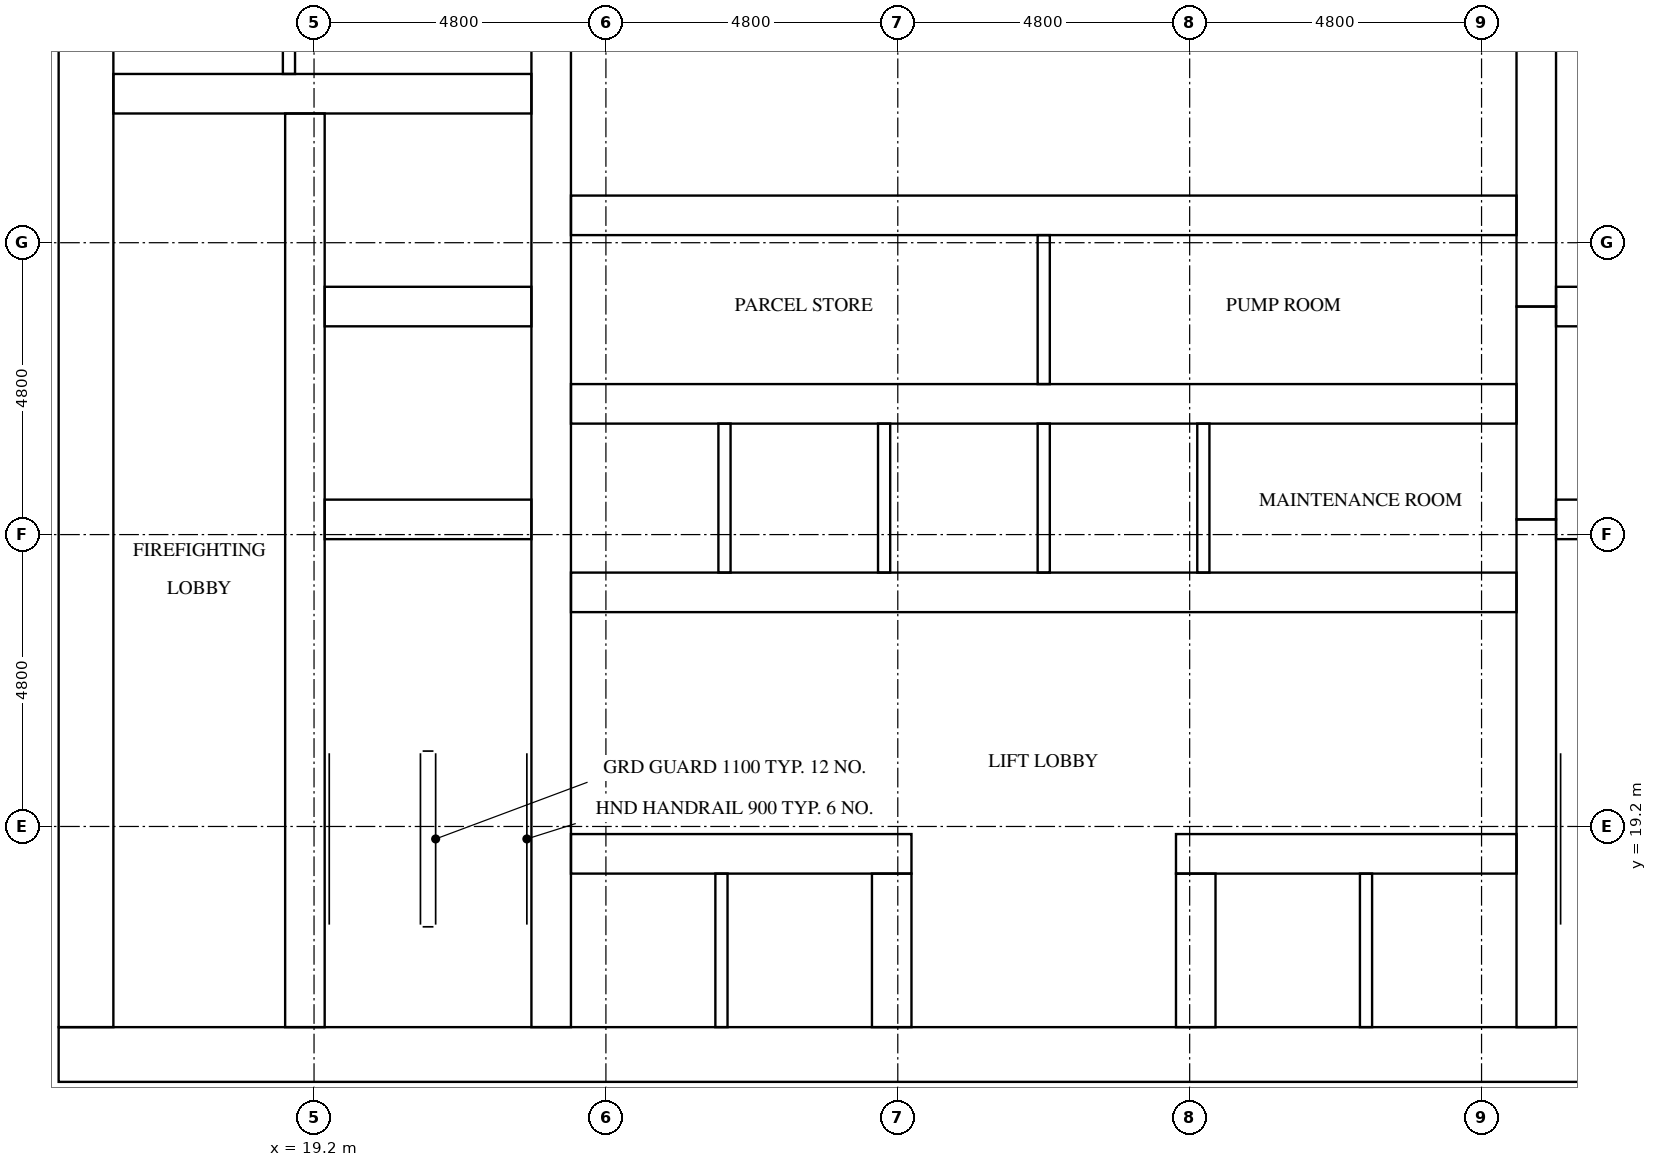
"""IFC4 building model, lengths in metres.
Left out: names, types, materials, properties, quantities, classifications, styles, units other than length and angle.
Written with IfcOpenShell. Run it as: python <this file> out.ifc"""

import sys

from ifc_helpers import new_model, si_unit, direction, frame, frame_2d, origin, place, context, subcontext, project, spatial, rectangle, extrude, element, fill, save


model = new_model("IFC4")
c1 = context("Model", 3, precision=1e-05, world=origin(), true_north=direction((0.0, 1.0)))
c2 = subcontext(c1, "Body", "Model", "MODEL_VIEW")
j1 = project(units=[si_unit("LENGTHUNIT", "METRE"), si_unit("PLANEANGLEUNIT", "RADIAN")], contexts=[c1])
p1 = place(None, origin())
s1 = spatial("IfcSite", under=j1, at=p1, CompositionType="ELEMENT")
p2 = place(p1, origin())
s2 = spatial("IfcBuilding", under=s1, at=p2, CompositionType="ELEMENT")
p3 = place(p2, frame((0.0, 0.0, 73.3)))
s3 = spatial("IfcBuildingStorey", under=s2, at=p3, CompositionType="ELEMENT", Elevation=73.3)
p4 = place(p3, frame((15.0, 15.45, 0.0), z_axis=(0.0, 0.0, 1.0), x_axis=(1.0, 0.0, 0.0)))
e1 = element("IfcWall", 1, at=p4, inside=s3, PredefinedType="SHEAR", context=c2, shape_type="SweptSolid", body=[
    extrude(rectangle(XDim=32.4, YDim=0.9, at=frame_2d((16.2, 0.0))), origin(), (0.0, 0.0, 1.0), 3.2),
])
p5 = place(p4, frame((15.3, 0.0, 0.0)))
e2 = element("IfcOpeningElement", 2, at=p5, cuts=e1, PredefinedType="OPENING", context=c2, shape_type="SweptSolid", body=[
    extrude(rectangle(XDim=1.8, YDim=2.1, at=frame_2d((0.9, 1.05))), frame((0.0, 0.46, 0.0), z_axis=(0.0, -1.0, 0.0), x_axis=(1.0, 0.0, 0.0)), (0.0, 0.0, 1.0), 0.92),
])
p6 = place(p3, frame((15.45, 15.9, 0.0), z_axis=(0.0, 0.0, 1.0), x_axis=(0.0, 1.0, 0.0)))
e3 = element("IfcWall", 3, at=p6, inside=s3, PredefinedType="SHEAR", context=c2, shape_type="SweptSolid", body=[
    extrude(rectangle(XDim=21.0, YDim=0.9, at=frame_2d((10.5, 0.0))), origin(), (0.0, 0.0, 1.0), 3.2),
])
p7 = place(p6, frame((4.86, 0.0, 0.0)))
e4 = element("IfcOpeningElement", 4, at=p7, cuts=e3, PredefinedType="OPENING", context=c2, shape_type="SweptSolid", body=[
    extrude(rectangle(XDim=1.2, YDim=2.1, at=frame_2d((0.6, 1.05))), frame((0.0, 0.46, 0.0), z_axis=(0.0, -1.0, 0.0), x_axis=(1.0, 0.0, 0.0)), (0.0, 0.0, 1.0), 0.92),
])
p8 = place(p3, frame((19.05, 15.9, 0.0), z_axis=(0.0, 0.0, 1.0), x_axis=(0.0, 1.0, 0.0)))
e5 = element("IfcWall", 5, at=p8, inside=s3, PredefinedType="SHEAR", context=c2, shape_type="SweptSolid", body=[
    extrude(rectangle(XDim=15.025, YDim=0.65, at=frame_2d((7.513, 0.0))), origin(), (0.0, 0.0, 1.0), 3.2),
])
p9 = place(p8, frame((9.55, 0.0, 0.0)))
e6 = element("IfcOpeningElement", 6, at=p9, cuts=e5, PredefinedType="OPENING", context=c2, shape_type="SweptSolid", body=[
    extrude(rectangle(XDim=1.1, YDim=2.1, at=frame_2d((0.55, 1.05))), frame((0.0, 0.335, 0.0), z_axis=(0.0, -1.0, 0.0), x_axis=(1.0, 0.0, 0.0)), (0.0, 0.0, 1.0), 0.67),
])
p10 = place(p8, frame((13.05, 0.0, 0.0)))
e7 = element("IfcOpeningElement", 7, at=p10, cuts=e5, PredefinedType="OPENING", context=c2, shape_type="SweptSolid", body=[
    extrude(rectangle(XDim=1.1, YDim=2.1, at=frame_2d((0.55, 1.05))), frame((0.0, 0.335, 0.0), z_axis=(0.0, -1.0, 0.0), x_axis=(1.0, 0.0, 0.0)), (0.0, 0.0, 1.0), 0.67),
])
p11 = place(p8, frame((0.3, 0.0, 0.0)))
e8 = element("IfcOpeningElement", 8, at=p11, cuts=e5, PredefinedType="OPENING", context=c2, shape_type="SweptSolid", body=[
    extrude(rectangle(XDim=1.2, YDim=2.1, at=frame_2d((0.6, 1.05))), frame((0.0, 0.335, 0.0), z_axis=(0.0, -1.0, 0.0), x_axis=(1.0, 0.0, 0.0)), (0.0, 0.0, 1.0), 0.67),
])
p12 = place(p3, frame((23.1, 15.9, 0.0), z_axis=(0.0, 0.0, 1.0), x_axis=(0.0, 1.0, 0.0)))
e9 = element("IfcWall", 9, at=p12, inside=s3, PredefinedType="SHEAR", context=c2, shape_type="SweptSolid", body=[
    extrude(rectangle(XDim=21.0, YDim=0.65, at=frame_2d((10.5, 0.0))), origin(), (0.0, 0.0, 1.0), 3.2),
])
p13 = place(p3, frame((39.3, 15.9, 0.0), z_axis=(0.0, 0.0, 1.0), x_axis=(0.0, 1.0, 0.0)))
e10 = element("IfcWall", 10, at=p13, inside=s3, PredefinedType="SHEAR", context=c2, shape_type="SweptSolid", body=[
    extrude(rectangle(XDim=8.35, YDim=0.65, at=frame_2d((4.175, 0.0))), origin(), (0.0, 0.0, 1.0), 3.2),
])
p14 = place(p3, frame((39.3, 24.25, 0.0), z_axis=(0.0, 0.0, 1.0), x_axis=(0.0, 1.0, 0.0)))
e11 = element("IfcWall", 11, at=p14, inside=s3, PredefinedType="SHEAR", context=c2, shape_type="SweptSolid", body=[
    extrude(rectangle(XDim=3.5, YDim=0.65, at=frame_2d((1.75, 0.0))), origin(), (0.0, 0.0, 1.0), 3.2),
])
p15 = place(p3, frame((39.3, 27.75, 0.0), z_axis=(0.0, 0.0, 1.0), x_axis=(0.0, 1.0, 0.0)))
e12 = element("IfcWall", 12, at=p15, inside=s3, PredefinedType="SHEAR", context=c2, shape_type="SweptSolid", body=[
    extrude(rectangle(XDim=9.15, YDim=0.65, at=frame_2d((4.575, 0.0))), origin(), (0.0, 0.0, 1.0), 3.2),
])
for number, where, z_axis, x_axis in (
    (13, (19.375, 24.25, 0.0), (0.0, 0.0, 1.0), (1.0, 0.0, 0.0)),
    (14, (19.375, 27.75, 0.0), (0.0, 0.0, 1.0), (1.0, 0.0, 0.0)),
):
    element("IfcWall", number, at=place(p3, frame(where, z_axis=z_axis, x_axis=x_axis)), inside=s3, PredefinedType="SHEAR", context=c2, shape_type="SweptSolid", body=[
        extrude(rectangle(XDim=3.4, YDim=0.65, at=frame_2d((1.7, 0.0))), origin(), (0.0, 0.0, 1.0), 3.2),
    ])
p16 = place(p3, frame((15.9, 31.25, 0.0), z_axis=(0.0, 0.0, 1.0), x_axis=(1.0, 0.0, 0.0)))
e15 = element("IfcWall", 15, at=p16, inside=s3, PredefinedType="SHEAR", context=c2, shape_type="SweptSolid", body=[
    extrude(rectangle(XDim=6.875, YDim=0.65, at=frame_2d((3.438, 0.0))), origin(), (0.0, 0.0, 1.0), 3.2),
])
for number, where, z_axis, x_axis in (
    (16, (39.625, 24.25, 0.0), (0.0, 0.0, 1.0), (1.0, 0.0, 0.0)),
    (17, (39.625, 27.75, 0.0), (0.0, 0.0, 1.0), (1.0, 0.0, 0.0)),
):
    element("IfcWall", number, at=place(p3, frame(where, z_axis=z_axis, x_axis=x_axis)), inside=s3, PredefinedType="SHEAR", context=c2, shape_type="SweptSolid", body=[
        extrude(rectangle(XDim=3.4, YDim=0.65, at=frame_2d((1.7, 0.0))), origin(), (0.0, 0.0, 1.0), 3.2),
    ])
p17 = place(p3, frame((23.425, 18.75, 0.0), z_axis=(0.0, 0.0, 1.0), x_axis=(1.0, 0.0, 0.0)))
e18 = element("IfcWall", 18, at=p17, inside=s3, PredefinedType="SHEAR", context=c2, shape_type="SweptSolid", body=[
    extrude(rectangle(XDim=5.6, YDim=0.65, at=frame_2d((2.8, 0.0))), origin(), (0.0, 0.0, 1.0), 3.2),
])
p18 = place(p17, frame((0.637, 0.0, 0.0)))
e19 = element("IfcOpeningElement", 19, at=p18, cuts=e18, PredefinedType="OPENING", context=c2, shape_type="SweptSolid", body=[
    extrude(rectangle(XDim=1.1, YDim=2.1, at=frame_2d((0.55, 1.05))), frame((0.0, 0.335, 0.0), z_axis=(0.0, -1.0, 0.0), x_axis=(1.0, 0.0, 0.0)), (0.0, 0.0, 1.0), 0.67),
])
p19 = place(p17, frame((3.212, 0.0, 0.0)))
e20 = element("IfcOpeningElement", 20, at=p19, cuts=e18, PredefinedType="OPENING", context=c2, shape_type="SweptSolid", body=[
    extrude(rectangle(XDim=1.1, YDim=2.1, at=frame_2d((0.55, 1.05))), frame((0.0, 0.335, 0.0), z_axis=(0.0, -1.0, 0.0), x_axis=(1.0, 0.0, 0.0)), (0.0, 0.0, 1.0), 0.67),
])
p20 = place(p3, frame((33.375, 18.75, 0.0), z_axis=(0.0, 0.0, 1.0), x_axis=(1.0, 0.0, 0.0)))
e21 = element("IfcWall", 21, at=p20, inside=s3, PredefinedType="SHEAR", context=c2, shape_type="SweptSolid", body=[
    extrude(rectangle(XDim=5.6, YDim=0.65, at=frame_2d((2.8, 0.0))), origin(), (0.0, 0.0, 1.0), 3.2),
])
p21 = place(p20, frame((1.288, 0.0, 0.0)))
e22 = element("IfcOpeningElement", 22, at=p21, cuts=e21, PredefinedType="OPENING", context=c2, shape_type="SweptSolid", body=[
    extrude(rectangle(XDim=1.1, YDim=2.1, at=frame_2d((0.55, 1.05))), frame((0.0, 0.335, 0.0), z_axis=(0.0, -1.0, 0.0), x_axis=(1.0, 0.0, 0.0)), (0.0, 0.0, 1.0), 0.67),
])
p22 = place(p20, frame((3.863, 0.0, 0.0)))
e23 = element("IfcOpeningElement", 23, at=p22, cuts=e21, PredefinedType="OPENING", context=c2, shape_type="SweptSolid", body=[
    extrude(rectangle(XDim=1.1, YDim=2.1, at=frame_2d((0.55, 1.05))), frame((0.0, 0.335, 0.0), z_axis=(0.0, -1.0, 0.0), x_axis=(1.0, 0.0, 0.0)), (0.0, 0.0, 1.0), 0.67),
])
p23 = place(p3, frame((23.425, 23.05, 0.0), z_axis=(0.0, 0.0, 1.0), x_axis=(1.0, 0.0, 0.0)))
e24 = element("IfcWall", 24, at=p23, inside=s3, PredefinedType="SHEAR", context=c2, shape_type="SweptSolid", body=[
    extrude(rectangle(XDim=15.55, YDim=0.65, at=frame_2d((7.775, 0.0))), origin(), (0.0, 0.0, 1.0), 3.2),
])
p24 = place(p23, frame((0.663, 0.0, 0.0)))
e25 = element("IfcOpeningElement", 25, at=p24, cuts=e24, PredefinedType="OPENING", context=c2, shape_type="SweptSolid", body=[
    extrude(rectangle(XDim=1.1, YDim=2.1, at=frame_2d((0.55, 1.05))), frame((0.0, 0.335, 0.0), z_axis=(0.0, -1.0, 0.0), x_axis=(1.0, 0.0, 0.0)), (0.0, 0.0, 1.0), 0.67),
])
p25 = place(p23, frame((3.288, 0.0, 0.0)))
e26 = element("IfcOpeningElement", 26, at=p25, cuts=e24, PredefinedType="OPENING", context=c2, shape_type="SweptSolid", body=[
    extrude(rectangle(XDim=1.1, YDim=2.1, at=frame_2d((0.55, 1.05))), frame((0.0, 0.335, 0.0), z_axis=(0.0, -1.0, 0.0), x_axis=(1.0, 0.0, 0.0)), (0.0, 0.0, 1.0), 0.67),
])
p26 = place(p23, frame((12.525, 0.0, 0.0)))
e27 = element("IfcOpeningElement", 27, at=p26, cuts=e24, PredefinedType="OPENING", context=c2, shape_type="SweptSolid", body=[
    extrude(rectangle(XDim=1.0, YDim=2.1, at=frame_2d((0.5, 1.05))), frame((0.0, 0.335, 0.0), z_axis=(0.0, -1.0, 0.0), x_axis=(1.0, 0.0, 0.0)), (0.0, 0.0, 1.0), 0.67),
])
p27 = place(p3, frame((23.425, 26.15, 0.0), z_axis=(0.0, 0.0, 1.0), x_axis=(1.0, 0.0, 0.0)))
e28 = element("IfcWall", 28, at=p27, inside=s3, PredefinedType="SHEAR", context=c2, shape_type="SweptSolid", body=[
    extrude(rectangle(XDim=15.55, YDim=0.65, at=frame_2d((7.775, 0.0))), origin(), (0.0, 0.0, 1.0), 3.2),
])
p28 = place(p3, frame((23.425, 29.25, 0.0), z_axis=(0.0, 0.0, 1.0), x_axis=(1.0, 0.0, 0.0)))
e29 = element("IfcWall", 29, at=p28, inside=s3, PredefinedType="SHEAR", context=c2, shape_type="SweptSolid", body=[
    extrude(rectangle(XDim=15.55, YDim=0.65, at=frame_2d((7.775, 0.0))), origin(), (0.0, 0.0, 1.0), 3.2),
])
p29 = place(p28, frame((3.337, 0.0, 0.0)))
e30 = element("IfcOpeningElement", 30, at=p29, cuts=e29, PredefinedType="OPENING", context=c2, shape_type="SweptSolid", body=[
    extrude(rectangle(XDim=1.0, YDim=2.1, at=frame_2d((0.5, 1.05))), frame((0.0, 0.335, 0.0), z_axis=(0.0, -1.0, 0.0), x_axis=(1.0, 0.0, 0.0)), (0.0, 0.0, 1.0), 0.67),
])
p30 = place(p28, frame((11.212, 0.0, 0.0)))
e31 = element("IfcOpeningElement", 31, at=p30, cuts=e29, PredefinedType="OPENING", context=c2, shape_type="SweptSolid", body=[
    extrude(rectangle(XDim=1.0, YDim=2.1, at=frame_2d((0.5, 1.05))), frame((0.0, 0.335, 0.0), z_axis=(0.0, -1.0, 0.0), x_axis=(1.0, 0.0, 0.0)), (0.0, 0.0, 1.0), 0.67),
])
for number, where, z_axis, x_axis in (
    (32, (28.7, 15.9, 0.0), (0.0, 0.0, 1.0), (0.0, 1.0, 0.0)),
    (33, (33.7, 15.9, 0.0), (0.0, 0.0, 1.0), (0.0, 1.0, 0.0)),
):
    element("IfcWall", number, at=place(p3, frame(where, z_axis=z_axis, x_axis=x_axis)), inside=s3, PredefinedType="SHEAR", context=c2, shape_type="SweptSolid", body=[
        extrude(rectangle(XDim=2.525, YDim=0.65, at=frame_2d((1.263, 0.0))), origin(), (0.0, 0.0, 1.0), 3.2),
    ])
for number, where, z_axis, x_axis in (
    (34, (25.95, 23.375, 0.0), (0.0, 0.0, 1.0), (0.0, 1.0, 0.0)),
    (35, (28.575, 23.375, 0.0), (0.0, 0.0, 1.0), (0.0, 1.0, 0.0)),
    (36, (31.2, 23.375, 0.0), (0.0, 0.0, 1.0), (0.0, 1.0, 0.0)),
    (37, (33.825, 23.375, 0.0), (0.0, 0.0, 1.0), (0.0, 1.0, 0.0)),
):
    element("IfcWall", number, at=place(p3, frame(where, z_axis=z_axis, x_axis=x_axis)), inside=s3, PredefinedType="SOLIDWALL", context=c2, shape_type="SweptSolid", body=[
        extrude(rectangle(XDim=2.45, YDim=0.2, at=frame_2d((1.225, 0.0))), origin(), (0.0, 0.0, 1.0), 3.2),
    ])
for number, where, z_axis, x_axis in (
    (38, (25.9, 15.9, 0.0), (0.0, 0.0, 1.0), (0.0, 1.0, 0.0)),
    (39, (36.5, 15.9, 0.0), (0.0, 0.0, 1.0), (0.0, 1.0, 0.0)),
):
    element("IfcWall", number, at=place(p3, frame(where, z_axis=z_axis, x_axis=x_axis)), inside=s3, PredefinedType="SOLIDWALL", context=c2, shape_type="SweptSolid", body=[
        extrude(rectangle(XDim=2.525, YDim=0.2, at=frame_2d((1.263, 0.0))), origin(), (0.0, 0.0, 1.0), 3.2),
    ])
p31 = place(p3, frame((18.788, 31.575, 0.0), z_axis=(0.0, 0.0, 1.0), x_axis=(0.0, 1.0, 0.0)))
e40 = element("IfcWall", 40, at=p31, inside=s3, PredefinedType="PARTITIONING", context=c2, shape_type="SweptSolid", body=[
    extrude(rectangle(XDim=5.325, YDim=0.2, at=frame_2d((2.663, 0.0))), origin(), (0.0, 0.0, 1.0), 3.2),
])
p32 = place(p3, frame((31.2, 26.475, 0.0), z_axis=(0.0, 0.0, 1.0), x_axis=(0.0, 1.0, 0.0)))
e41 = element("IfcWall", 41, at=p32, inside=s3, PredefinedType="PARTITIONING", context=c2, shape_type="SweptSolid", body=[
    extrude(rectangle(XDim=2.45, YDim=0.2, at=frame_2d((1.225, 0.0))), origin(), (0.0, 0.0, 1.0), 3.2),
])
p33 = place(p18, origin())
e42 = element("IfcDoor", 42, at=p33, inside=s3, OperationType="DOUBLE_DOOR_SLIDING", PredefinedType="DOOR", context=c2, shape_type="SweptSolid", body=[
    extrude(rectangle(XDim=1.1, YDim=2.1, at=frame_2d((0.55, 1.05))), frame((0.0, 0.025, 0.0), z_axis=(0.0, -1.0, 0.0), x_axis=(1.0, 0.0, 0.0)), (0.0, 0.0, 1.0), 0.05),
])
fill(e19, e42)
p34 = place(p19, origin())
e43 = element("IfcDoor", 43, at=p34, inside=s3, OperationType="DOUBLE_DOOR_SLIDING", PredefinedType="DOOR", context=c2, shape_type="SweptSolid", body=[
    extrude(rectangle(XDim=1.1, YDim=2.1, at=frame_2d((0.55, 1.05))), frame((0.0, 0.025, 0.0), z_axis=(0.0, -1.0, 0.0), x_axis=(1.0, 0.0, 0.0)), (0.0, 0.0, 1.0), 0.05),
])
fill(e20, e43)
p35 = place(p21, origin())
e44 = element("IfcDoor", 44, at=p35, inside=s3, OperationType="DOUBLE_DOOR_SLIDING", PredefinedType="DOOR", context=c2, shape_type="SweptSolid", body=[
    extrude(rectangle(XDim=1.1, YDim=2.1, at=frame_2d((0.55, 1.05))), frame((0.0, 0.025, 0.0), z_axis=(0.0, -1.0, 0.0), x_axis=(1.0, 0.0, 0.0)), (0.0, 0.0, 1.0), 0.05),
])
fill(e22, e44)
p36 = place(p22, origin())
e45 = element("IfcDoor", 45, at=p36, inside=s3, OperationType="DOUBLE_DOOR_SLIDING", PredefinedType="DOOR", context=c2, shape_type="SweptSolid", body=[
    extrude(rectangle(XDim=1.1, YDim=2.1, at=frame_2d((0.55, 1.05))), frame((0.0, 0.025, 0.0), z_axis=(0.0, -1.0, 0.0), x_axis=(1.0, 0.0, 0.0)), (0.0, 0.0, 1.0), 0.05),
])
fill(e23, e45)
p37 = place(p24, origin())
e46 = element("IfcDoor", 46, at=p37, inside=s3, OperationType="DOUBLE_DOOR_SLIDING", PredefinedType="DOOR", context=c2, shape_type="SweptSolid", body=[
    extrude(rectangle(XDim=1.1, YDim=2.1, at=frame_2d((0.55, 1.05))), frame((0.0, 0.025, 0.0), z_axis=(0.0, -1.0, 0.0), x_axis=(1.0, 0.0, 0.0)), (0.0, 0.0, 1.0), 0.05),
])
fill(e25, e46)
p38 = place(p25, origin())
e47 = element("IfcDoor", 47, at=p38, inside=s3, OperationType="DOUBLE_DOOR_SLIDING", PredefinedType="DOOR", context=c2, shape_type="SweptSolid", body=[
    extrude(rectangle(XDim=1.1, YDim=2.1, at=frame_2d((0.55, 1.05))), frame((0.0, 0.025, 0.0), z_axis=(0.0, -1.0, 0.0), x_axis=(1.0, 0.0, 0.0)), (0.0, 0.0, 1.0), 0.05),
])
fill(e26, e47)
p39 = place(p9, origin())
e48 = element("IfcDoor", 48, at=p39, inside=s3, OperationType="DOUBLE_DOOR_SLIDING", PredefinedType="DOOR", context=c2, shape_type="SweptSolid", body=[
    extrude(rectangle(XDim=1.1, YDim=2.1, at=frame_2d((0.55, 1.05))), frame((0.0, 0.025, 0.0), z_axis=(0.0, -1.0, 0.0), x_axis=(1.0, 0.0, 0.0)), (0.0, 0.0, 1.0), 0.05),
])
fill(e6, e48)
p40 = place(p10, origin())
e49 = element("IfcDoor", 49, at=p40, inside=s3, OperationType="DOUBLE_DOOR_SLIDING", PredefinedType="DOOR", context=c2, shape_type="SweptSolid", body=[
    extrude(rectangle(XDim=1.1, YDim=2.1, at=frame_2d((0.55, 1.05))), frame((0.0, 0.025, 0.0), z_axis=(0.0, -1.0, 0.0), x_axis=(1.0, 0.0, 0.0)), (0.0, 0.0, 1.0), 0.05),
])
fill(e7, e49)
p41 = place(p11, frame((1.2, 0.0, 0.0), z_axis=(0.0, 0.0, 1.0), x_axis=(-1.0, 0.0, 0.0)))
e50 = element("IfcDoor", 50, at=p41, inside=s3, OperationType="SINGLE_SWING_RIGHT", PredefinedType="DOOR", context=c2, shape_type="SweptSolid", body=[
    extrude(rectangle(XDim=1.2, YDim=2.1, at=frame_2d((0.6, 1.05))), frame((0.0, 0.025, 0.0), z_axis=(0.0, -1.0, 0.0), x_axis=(1.0, 0.0, 0.0)), (0.0, 0.0, 1.0), 0.05),
])
fill(e8, e50)
p42 = place(p5, frame((1.8, 0.0, 0.0), z_axis=(0.0, 0.0, 1.0), x_axis=(-1.0, 0.0, 0.0)))
e51 = element("IfcDoor", 51, at=p42, inside=s3, OperationType="DOUBLE_DOOR_SINGLE_SWING", PredefinedType="DOOR", context=c2, shape_type="SweptSolid", body=[
    extrude(rectangle(XDim=1.8, YDim=2.1, at=frame_2d((0.9, 1.05))), frame((0.0, 0.025, 0.0), z_axis=(0.0, -1.0, 0.0), x_axis=(1.0, 0.0, 0.0)), (0.0, 0.0, 1.0), 0.05),
])
fill(e2, e51)
p43 = place(p7, frame((1.2, 0.0, 0.0), z_axis=(0.0, 0.0, 1.0), x_axis=(-1.0, 0.0, 0.0)))
e52 = element("IfcDoor", 52, at=p43, inside=s3, OperationType="SINGLE_SWING_LEFT", PredefinedType="DOOR", context=c2, shape_type="SweptSolid", body=[
    extrude(rectangle(XDim=1.2, YDim=2.1, at=frame_2d((0.6, 1.05))), frame((0.0, 0.025, 0.0), z_axis=(0.0, -1.0, 0.0), x_axis=(1.0, 0.0, 0.0)), (0.0, 0.0, 1.0), 0.05),
])
fill(e4, e52)
p44 = place(p26, frame((1.0, 0.0, 0.0), z_axis=(0.0, 0.0, 1.0), x_axis=(-1.0, 0.0, 0.0)))
e53 = element("IfcDoor", 53, at=p44, inside=s3, OperationType="SINGLE_SWING_LEFT", PredefinedType="DOOR", context=c2, shape_type="SweptSolid", body=[
    extrude(rectangle(XDim=1.0, YDim=2.1, at=frame_2d((0.5, 1.05))), frame((0.0, 0.025, 0.0), z_axis=(0.0, -1.0, 0.0), x_axis=(1.0, 0.0, 0.0)), (0.0, 0.0, 1.0), 0.05),
])
fill(e27, e53)
p45 = place(p29, origin())
e54 = element("IfcDoor", 54, at=p45, inside=s3, OperationType="SINGLE_SWING_RIGHT", PredefinedType="DOOR", context=c2, shape_type="SweptSolid", body=[
    extrude(rectangle(XDim=1.0, YDim=2.1, at=frame_2d((0.5, 1.05))), frame((0.0, 0.025, 0.0), z_axis=(0.0, -1.0, 0.0), x_axis=(1.0, 0.0, 0.0)), (0.0, 0.0, 1.0), 0.05),
])
fill(e30, e54)
p46 = place(p30, origin())
e55 = element("IfcDoor", 55, at=p46, inside=s3, OperationType="SINGLE_SWING_LEFT", PredefinedType="DOOR", context=c2, shape_type="SweptSolid", body=[
    extrude(rectangle(XDim=1.0, YDim=2.1, at=frame_2d((0.5, 1.05))), frame((0.0, 0.025, 0.0), z_axis=(0.0, -1.0, 0.0), x_axis=(1.0, 0.0, 0.0)), (0.0, 0.0, 1.0), 0.05),
])
fill(e31, e55)
save(model, sys.argv[1])
